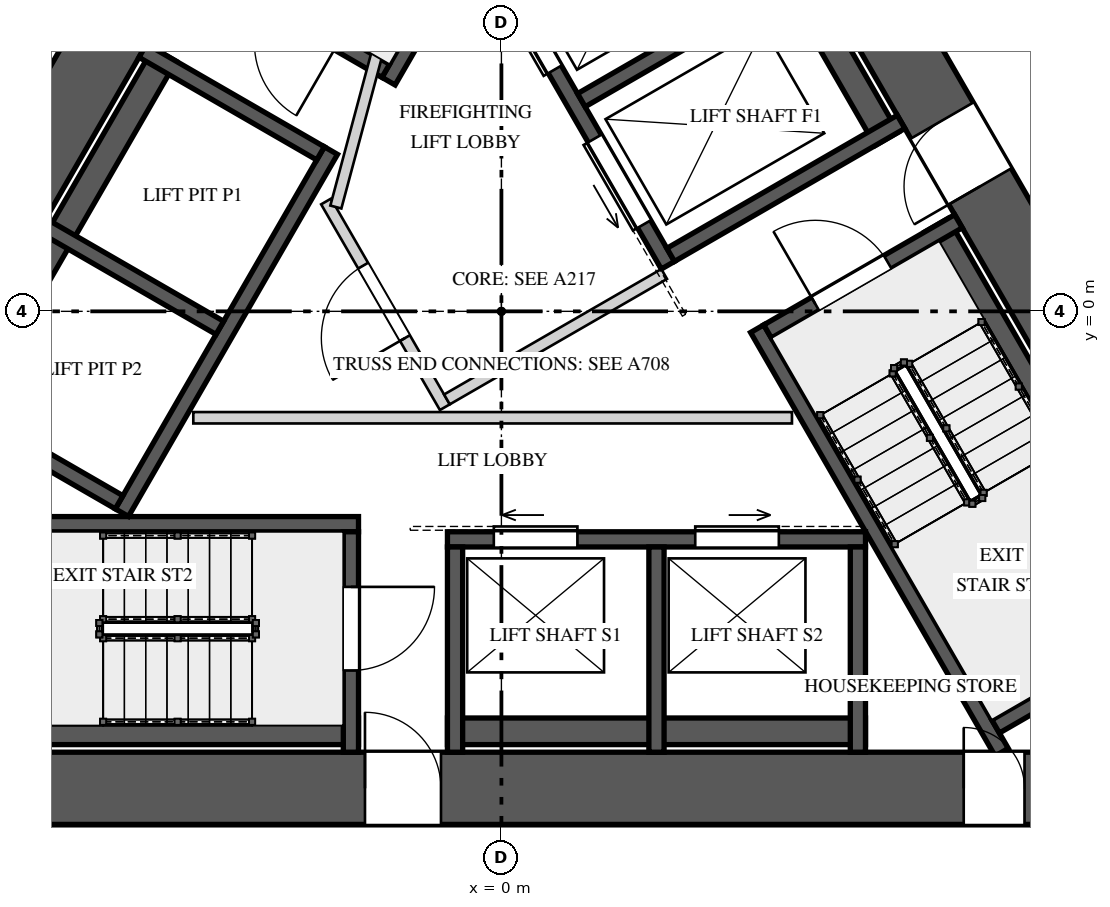
"""IFC4 building model, lengths in metres.
Left out: names, types, materials, properties, quantities, classifications, styles, units other than length and angle.
Written with IfcOpenShell. Run it as: python <this file> out.ifc"""

import sys

from ifc_helpers import new_model, si_unit, direction, frame, frame_2d, origin, place, context, subcontext, project, spatial, rectangle, extrude, element, fill, save


model = new_model("IFC4")
c1 = context("Model", 3, precision=1e-05, world=origin(), true_north=direction((0.0, 1.0)))
c2 = subcontext(c1, "Body", "Model", "MODEL_VIEW")
j1 = project(units=[si_unit("LENGTHUNIT", "METRE"), si_unit("PLANEANGLEUNIT", "RADIAN")], contexts=[c1])
p1 = place(None, origin())
s1 = spatial("IfcSite", under=j1, at=p1, CompositionType="ELEMENT")
p2 = place(p1, origin())
s2 = spatial("IfcBuilding", under=s1, at=p2, CompositionType="ELEMENT")
p3 = place(p2, frame((0.0, 0.0, 120.4)))
s3 = spatial("IfcBuildingStorey", under=s2, at=p3, CompositionType="ELEMENT", Elevation=120.4)
p4 = place(p3, frame((-1.169, 10.525, 0.0), z_axis=(0.0, 0.0, 1.0), x_axis=(-0.499999102847, -0.866025921755, 0.0)))
e1 = element("IfcWall", 1, at=p4, inside=s3, PredefinedType="SHEAR", context=c2, shape_type="SweptSolid", body=[
    extrude(rectangle(XDim=17.061, YDim=0.95, at=frame_2d((8.53, 0.0))), origin(), (0.0, 0.0, 1.0), 5.2),
])
p5 = place(p4, frame((6.735, 0.0, 0.0)))
e2 = element("IfcOpeningElement", 2, at=p5, cuts=e1, PredefinedType="OPENING", context=c2, shape_type="SweptSolid", body=[
    extrude(rectangle(XDim=1.0, YDim=2.4, at=frame_2d((0.5, 1.2))), frame((0.0, 0.485, 0.0), z_axis=(0.0, -1.0, 0.0), x_axis=(1.0, 0.0, 0.0)), (0.0, 0.0, 1.0), 0.97),
])
p6 = place(p3, frame((-8.531, -6.275, 0.0), z_axis=(0.0, 0.0, 1.0), x_axis=(1.0, 0.0, 0.0)))
e3 = element("IfcWall", 3, at=p6, inside=s3, PredefinedType="SHEAR", context=c2, shape_type="SweptSolid", body=[
    extrude(rectangle(XDim=17.061, YDim=0.95, at=frame_2d((8.531, 0.0))), origin(), (0.0, 0.0, 1.0), 5.2),
])
p7 = place(p6, frame((6.735, 0.0, 0.0)))
e4 = element("IfcOpeningElement", 4, at=p7, cuts=e3, PredefinedType="OPENING", context=c2, shape_type="SweptSolid", body=[
    extrude(rectangle(XDim=1.0, YDim=2.4, at=frame_2d((0.5, 1.2))), frame((0.0, 0.485, 0.0), z_axis=(0.0, -1.0, 0.0), x_axis=(1.0, 0.0, 0.0)), (0.0, 0.0, 1.0), 0.97),
])
p8 = place(p6, frame((14.613, 0.0, 0.0)))
e5 = element("IfcOpeningElement", 5, at=p8, cuts=e3, PredefinedType="OPENING", context=c2, shape_type="SweptSolid", body=[
    extrude(rectangle(XDim=0.8, YDim=2.1, at=frame_2d((0.4, 1.05))), frame((0.0, 0.485, 0.0), z_axis=(0.0, -1.0, 0.0), x_axis=(1.0, 0.0, 0.0)), (0.0, 0.0, 1.0), 0.97),
])
p9 = place(p3, frame((9.699, -4.25, 0.0), z_axis=(0.0, 0.0, 1.0), x_axis=(-0.499999102847, 0.866025921755, 0.0)))
e6 = element("IfcWall", 6, at=p9, inside=s3, PredefinedType="SHEAR", context=c2, shape_type="SweptSolid", body=[
    extrude(rectangle(XDim=17.061, YDim=0.95, at=frame_2d((8.53, 0.0))), origin(), (0.0, 0.0, 1.0), 5.2),
])
p10 = place(p9, frame((6.805, 0.0, 0.0)))
e7 = element("IfcOpeningElement", 7, at=p10, cuts=e6, PredefinedType="OPENING", context=c2, shape_type="SweptSolid", body=[
    extrude(rectangle(XDim=1.0, YDim=2.4, at=frame_2d((0.5, 1.2))), frame((0.0, 0.485, 0.0), z_axis=(0.0, -1.0, 0.0), x_axis=(1.0, 0.0, 0.0)), (0.0, 0.0, 1.0), 0.97),
])
p11 = place(p9, frame((14.114, 0.0, 0.0)))
e8 = element("IfcOpeningElement", 8, at=p11, cuts=e6, PredefinedType="OPENING", context=c2, shape_type="SweptSolid", body=[
    extrude(rectangle(XDim=0.8, YDim=2.1, at=frame_2d((0.4, 1.05))), frame((0.0, 0.485, 0.0), z_axis=(0.0, -1.0, 0.0), x_axis=(1.0, 0.0, 0.0)), (0.0, 0.0, 1.0), 0.97),
])
p12 = place(p3, frame((1.732, 8.6, 0.0), z_axis=(0.0, 0.0, 1.0), x_axis=(-0.499975376872, -0.866039619487, 0.0)))
e9 = element("IfcWall", 9, at=p12, inside=s3, PredefinedType="SOLIDWALL", context=c2, shape_type="SweptSolid", body=[
    extrude(rectangle(XDim=6.434, YDim=0.2, at=frame_2d((3.217, 0.0))), origin(), (0.0, 0.0, 1.0), 4.85),
])
p13 = place(p3, frame((-1.521, 3.165, 0.0), z_axis=(0.0, 0.0, 1.0), x_axis=(-0.866032775405, 0.499987231761, 0.0)))
e10 = element("IfcWall", 10, at=p13, inside=s3, PredefinedType="SOLIDWALL", context=c2, shape_type="SweptSolid", body=[
    extrude(rectangle(XDim=2.9, YDim=0.2, at=frame_2d((1.45, 0.0))), origin(), (0.0, 0.0, 1.0), 4.85),
])
p14 = place(p13, frame((0.725, 0.0, 0.0)))
e11 = element("IfcOpeningElement", 11, at=p14, cuts=e10, PredefinedType="OPENING", context=c2, shape_type="SweptSolid", body=[
    extrude(rectangle(XDim=1.1, YDim=2.4, at=frame_2d((0.55, 1.2))), frame((0.0, 0.11, 0.0), z_axis=(0.0, -1.0, 0.0), x_axis=(1.0, 0.0, 0.0)), (0.0, 0.0, 1.0), 0.22),
])
p15 = place(p3, frame((-8.08, -5.525, 0.0), z_axis=(0.0, 0.0, 1.0), x_axis=(1.0, 0.0, 0.0)))
e12 = element("IfcWall", 12, at=p15, inside=s3, PredefinedType="SOLIDWALL", context=c2, shape_type="SweptSolid", body=[
    extrude(rectangle(XDim=6.2, YDim=0.35, at=frame_2d((3.1, 0.0))), origin(), (0.0, 0.0, 1.0), 4.85),
])
p16 = place(p3, frame((-8.314, -2.8, 0.0), z_axis=(0.0, 0.0, 1.0), x_axis=(1.0, 0.0, 0.0)))
e13 = element("IfcWall", 13, at=p16, inside=s3, PredefinedType="SOLIDWALL", context=c2, shape_type="SweptSolid", body=[
    extrude(rectangle(XDim=6.434, YDim=0.2, at=frame_2d((3.217, 0.0))), origin(), (0.0, 0.0, 1.0), 4.85),
])
p17 = place(p3, frame((-1.98, -2.9, 0.0), z_axis=(0.0, 0.0, 1.0), x_axis=(0.0, -1.0, 0.0)))
e14 = element("IfcWall", 14, at=p17, inside=s3, PredefinedType="SOLIDWALL", context=c2, shape_type="SweptSolid", body=[
    extrude(rectangle(XDim=2.9, YDim=0.2, at=frame_2d((1.45, 0.0))), origin(), (0.0, 0.0, 1.0), 4.85),
])
p18 = place(p17, frame((0.725, 0.0, 0.0)))
e15 = element("IfcOpeningElement", 15, at=p18, cuts=e14, PredefinedType="OPENING", context=c2, shape_type="SweptSolid", body=[
    extrude(rectangle(XDim=1.1, YDim=2.4, at=frame_2d((0.55, 1.2))), frame((0.0, 0.11, 0.0), z_axis=(0.0, -1.0, 0.0), x_axis=(1.0, 0.0, 0.0)), (0.0, 0.0, 1.0), 0.22),
])
p19 = place(p3, frame((8.825, -4.235, 0.0), z_axis=(0.0, 0.0, 1.0), x_axis=(-0.499997426962, 0.866026889324, 0.0)))
e16 = element("IfcWall", 16, at=p19, inside=s3, PredefinedType="SOLIDWALL", context=c2, shape_type="SweptSolid", body=[
    extrude(rectangle(XDim=6.2, YDim=0.35, at=frame_2d((3.1, 0.0))), origin(), (0.0, 0.0, 1.0), 4.85),
])
p20 = place(p3, frame((6.582, -5.8, 0.0), z_axis=(0.0, 0.0, 1.0), x_axis=(-0.499975376872, 0.866039619487, 0.0)))
e17 = element("IfcWall", 17, at=p20, inside=s3, PredefinedType="SOLIDWALL", context=c2, shape_type="SweptSolid", body=[
    extrude(rectangle(XDim=6.434, YDim=0.2, at=frame_2d((3.217, 0.0))), origin(), (0.0, 0.0, 1.0), 4.85),
])
p21 = place(p3, frame((6.501, -5.461, 0.0), z_axis=(0.0, 0.0, 1.0), x_axis=(0.866032775405, 0.499987231761, 0.0)))
e18 = element("IfcWall", 18, at=p21, inside=s3, PredefinedType="SOLIDWALL", context=c2, shape_type="SweptSolid", body=[
    extrude(rectangle(XDim=2.9, YDim=0.2, at=frame_2d((1.45, 0.0))), origin(), (0.0, 0.0, 1.0), 4.85),
])
p22 = place(p3, frame((3.501, -0.265, 0.0), z_axis=(0.0, 0.0, 1.0), x_axis=(0.866032775405, 0.499987231761, 0.0)))
e19 = element("IfcWall", 19, at=p22, inside=s3, PredefinedType="SOLIDWALL", context=c2, shape_type="SweptSolid", body=[
    extrude(rectangle(XDim=2.9, YDim=0.2, at=frame_2d((1.45, 0.0))), origin(), (0.0, 0.0, 1.0), 4.85),
])
p23 = place(p22, frame((0.725, 0.0, 0.0)))
e20 = element("IfcOpeningElement", 20, at=p23, cuts=e19, PredefinedType="OPENING", context=c2, shape_type="SweptSolid", body=[
    extrude(rectangle(XDim=1.1, YDim=2.4, at=frame_2d((0.55, 1.2))), frame((0.0, 0.11, 0.0), z_axis=(0.0, -1.0, 0.0), x_axis=(1.0, 0.0, 0.0)), (0.0, 0.0, 1.0), 0.22),
])
p24 = place(p3, frame((-2.243, 2.115, 0.0), z_axis=(0.0, 0.0, 1.0), x_axis=(-0.499996545922, -0.866027397988, 0.0)))
e21 = element("IfcWall", 21, at=p24, inside=s3, PredefinedType="SOLIDWALL", context=c2, shape_type="SweptSolid", body=[
    extrude(rectangle(XDim=5.5, YDim=0.2, at=frame_2d((2.75, 0.0))), origin(), (0.0, 0.0, 1.0), 4.85),
])
p25 = place(p3, frame((-4.43, 3.377, 0.0), z_axis=(0.0, 0.0, 1.0), x_axis=(-0.499996545922, -0.866027397988, 0.0)))
e22 = element("IfcWall", 22, at=p25, inside=s3, PredefinedType="SOLIDWALL", context=c2, shape_type="SweptSolid", body=[
    extrude(rectangle(XDim=5.5, YDim=0.35, at=frame_2d((2.75, 0.0))), origin(), (0.0, 0.0, 1.0), 4.85),
])
p26 = place(p3, frame((-2.38, 2.078, 0.0), z_axis=(0.0, 0.0, 1.0), x_axis=(-0.866059108428, 0.4999416173, 0.0)))
e23 = element("IfcWall", 23, at=p26, inside=s3, PredefinedType="SOLIDWALL", context=c2, shape_type="SweptSolid", body=[
    extrude(rectangle(XDim=2.7, YDim=0.2, at=frame_2d((1.35, 0.0))), origin(), (0.0, 0.0, 1.0), 4.85),
])
p27 = place(p3, frame((-3.705, -0.217, 0.0), z_axis=(0.0, 0.0, 1.0), x_axis=(-0.866019956843, 0.50000943426, 0.0)))
e24 = element("IfcWall", 24, at=p27, inside=s3, PredefinedType="SOLIDWALL", context=c2, shape_type="SweptSolid", body=[
    extrude(rectangle(XDim=2.7, YDim=0.2, at=frame_2d((1.35, 0.0))), origin(), (0.0, 0.0, 1.0), 4.85),
])
p28 = place(p3, frame((-5.03, -2.512, 0.0), z_axis=(0.0, 0.0, 1.0), x_axis=(-0.86599734893, 0.500048589285, 0.0)))
e25 = element("IfcWall", 25, at=p28, inside=s3, PredefinedType="SOLIDWALL", context=c2, shape_type="SweptSolid", body=[
    extrude(rectangle(XDim=2.7, YDim=0.2, at=frame_2d((1.35, 0.0))), origin(), (0.0, 0.0, 1.0), 4.85),
])
p29 = place(p3, frame((-0.71, -3.0, 0.0), z_axis=(0.0, 0.0, 1.0), x_axis=(1.0, 0.0, 0.0)))
e26 = element("IfcWall", 26, at=p29, inside=s3, PredefinedType="SOLIDWALL", context=c2, shape_type="SweptSolid", body=[
    extrude(rectangle(XDim=5.5, YDim=0.2, at=frame_2d((2.75, 0.0))), origin(), (0.0, 0.0, 1.0), 4.85),
])
p30 = place(p29, frame((0.61, 0.0, 0.0)))
e27 = element("IfcOpeningElement", 27, at=p30, cuts=e26, PredefinedType="OPENING", context=c2, shape_type="SweptSolid", body=[
    extrude(rectangle(XDim=1.1, YDim=2.1, at=frame_2d((0.55, 1.05))), frame((0.0, 0.11, 0.0), z_axis=(0.0, -1.0, 0.0), x_axis=(1.0, 0.0, 0.0)), (0.0, 0.0, 1.0), 0.22),
])
p31 = place(p29, frame((3.26, 0.0, 0.0)))
e28 = element("IfcOpeningElement", 28, at=p31, cuts=e26, PredefinedType="OPENING", context=c2, shape_type="SweptSolid", body=[
    extrude(rectangle(XDim=1.1, YDim=2.1, at=frame_2d((0.55, 1.05))), frame((0.0, 0.11, 0.0), z_axis=(0.0, -1.0, 0.0), x_axis=(1.0, 0.0, 0.0)), (0.0, 0.0, 1.0), 0.22),
])
p32 = place(p3, frame((-0.71, -5.525, 0.0), z_axis=(0.0, 0.0, 1.0), x_axis=(1.0, 0.0, 0.0)))
e29 = element("IfcWall", 29, at=p32, inside=s3, PredefinedType="SOLIDWALL", context=c2, shape_type="SweptSolid", body=[
    extrude(rectangle(XDim=5.5, YDim=0.35, at=frame_2d((2.75, 0.0))), origin(), (0.0, 0.0, 1.0), 4.85),
])
for number, where, z_axis, x_axis in (
    (30, (-0.61, -3.1, 0.0), (0.0, 0.0, 1.0), (0.0, -1.0, 0.0)),
    (31, (2.04, -3.1, 0.0), (0.0, 0.0, 1.0), (0.0, -1.0, 0.0)),
    (32, (4.69, -3.1, 0.0), (0.0, 0.0, 1.0), (0.0, -1.0, 0.0)),
):
    element("IfcWall", number, at=place(p3, frame(where, z_axis=z_axis, x_axis=x_axis)), inside=s3, PredefinedType="SOLIDWALL", context=c2, shape_type="SweptSolid", body=[
        extrude(rectangle(XDim=2.7, YDim=0.2, at=frame_2d((1.35, 0.0))), origin(), (0.0, 0.0, 1.0), 4.85),
    ])
p33 = place(p3, frame((2.19, 0.606, 0.0), z_axis=(0.0, 0.0, 1.0), x_axis=(-0.500002801628, 0.866023786258, 0.0)))
e33 = element("IfcWall", 33, at=p33, inside=s3, PredefinedType="SOLIDWALL", context=c2, shape_type="SweptSolid", body=[
    extrude(rectangle(XDim=4.9, YDim=0.2, at=frame_2d((2.45, 0.0))), origin(), (0.0, 0.0, 1.0), 4.85),
])
p34 = place(p33, frame((0.625, 0.0, 0.0)))
e34 = element("IfcOpeningElement", 34, at=p34, cuts=e33, PredefinedType="OPENING", context=c2, shape_type="SweptSolid", body=[
    extrude(rectangle(XDim=1.3, YDim=2.1, at=frame_2d((0.65, 1.05))), frame((0.0, 0.11, 0.0), z_axis=(0.0, -1.0, 0.0), x_axis=(1.0, 0.0, 0.0)), (0.0, 0.0, 1.0), 0.22),
])
p35 = place(p33, frame((2.975, 0.0, 0.0)))
e35 = element("IfcOpeningElement", 35, at=p35, cuts=e33, PredefinedType="OPENING", context=c2, shape_type="SweptSolid", body=[
    extrude(rectangle(XDim=1.3, YDim=2.1, at=frame_2d((0.65, 1.05))), frame((0.0, 0.11, 0.0), z_axis=(0.0, -1.0, 0.0), x_axis=(1.0, 0.0, 0.0)), (0.0, 0.0, 1.0), 0.22),
])
p36 = place(p3, frame((5.07, 2.269, 0.0), z_axis=(0.0, 0.0, 1.0), x_axis=(-0.49998122708, 0.866036242063, 0.0)))
e36 = element("IfcWall", 36, at=p36, inside=s3, PredefinedType="SOLIDWALL", context=c2, shape_type="SweptSolid", body=[
    extrude(rectangle(XDim=4.9, YDim=0.35, at=frame_2d((2.45, 0.0))), origin(), (0.0, 0.0, 1.0), 4.85),
])
for number, where, z_axis, x_axis in (
    (37, (2.227, 0.743, 0.0), (0.0, 0.0, 1.0), (0.866, 0.5, 0.0)),
    (38, (1.052, 2.778, 0.0), (0.0, 0.0, 1.0), (0.866, 0.5, 0.0)),
):
    element("IfcWall", number, at=place(p3, frame(where, z_axis=z_axis, x_axis=x_axis)), inside=s3, PredefinedType="SOLIDWALL", context=c2, shape_type="SweptSolid", body=[
        extrude(rectangle(XDim=3.5, YDim=0.2, at=frame_2d((1.75, 0.0))), origin(), (0.0, 0.0, 1.0), 4.85),
    ])
p37 = place(p3, frame((-0.744, -1.261, 0.0), z_axis=(0.0, 0.0, 1.0), x_axis=(-0.500004234368, 0.866022959057, 0.0)))
e39 = element("IfcWall", 39, at=p37, inside=s3, PredefinedType="PARTITIONING", context=c2, shape_type="SweptSolid", body=[
    extrude(rectangle(XDim=3.125, YDim=0.15, at=frame_2d((1.562, 0.0))), origin(), (0.0, 0.0, 1.0), 4.85),
])
p38 = place(p37, frame((1.05, 0.0, 0.0)))
e40 = element("IfcOpeningElement", 40, at=p38, cuts=e39, PredefinedType="OPENING", context=c2, shape_type="SweptSolid", body=[
    extrude(rectangle(XDim=1.1, YDim=2.4, at=frame_2d((0.55, 1.2))), frame((0.0, 0.085, 0.0), z_axis=(0.0, -1.0, 0.0), x_axis=(1.0, 0.0, 0.0)), (0.0, 0.0, 1.0), 0.17),
])
p39 = place(p3, frame((-0.717, -1.159, 0.0), z_axis=(0.0, 0.0, 1.0), x_axis=(0.866008176907, 0.50002983664, 0.0)))
e41 = element("IfcWall", 41, at=p39, inside=s3, PredefinedType="PARTITIONING", context=c2, shape_type="SweptSolid", body=[
    extrude(rectangle(XDim=3.3, YDim=0.15, at=frame_2d((1.65, 0.0))), origin(), (0.0, 0.0, 1.0), 4.85),
])
p40 = place(p3, frame((-2.178, 1.372, 0.0), z_axis=(0.0, 0.0, 1.0), x_axis=(0.258808958833, 0.96592852884, 0.0)))
e42 = element("IfcWall", 42, at=p40, inside=s3, PredefinedType="PARTITIONING", context=c2, shape_type="SweptSolid", body=[
    extrude(rectangle(XDim=2.903, YDim=0.15, at=frame_2d((1.451, 0.0))), origin(), (0.0, 0.0, 1.0), 4.85),
])
p41 = place(p3, frame((-4.053, -1.4, 0.0), z_axis=(0.0, 0.0, 1.0), x_axis=(1.0, 0.0, 0.0)))
e43 = element("IfcWall", 43, at=p41, inside=s3, PredefinedType="PARTITIONING", context=c2, shape_type="SweptSolid", body=[
    extrude(rectangle(XDim=7.876, YDim=0.15, at=frame_2d((3.938, 0.0))), origin(), (0.0, 0.0, 1.0), 4.85),
])
p42 = place(p18, origin())
e44 = element("IfcDoor", 44, at=p42, inside=s3, OperationType="SINGLE_SWING_LEFT", PredefinedType="DOOR", context=c2, shape_type="SweptSolid", body=[
    extrude(rectangle(XDim=1.1, YDim=2.4, at=frame_2d((0.55, 1.2))), frame((0.0, 0.025, 0.0), z_axis=(0.0, -1.0, 0.0), x_axis=(1.0, 0.0, 0.0)), (0.0, 0.0, 1.0), 0.05),
])
fill(e15, e44)
p43 = place(p23, origin())
e45 = element("IfcDoor", 45, at=p43, inside=s3, OperationType="SINGLE_SWING_RIGHT", PredefinedType="DOOR", context=c2, shape_type="SweptSolid", body=[
    extrude(rectangle(XDim=1.1, YDim=2.4, at=frame_2d((0.55, 1.2))), frame((0.0, 0.025, 0.0), z_axis=(0.0, -1.0, 0.0), x_axis=(1.0, 0.0, 0.0)), (0.0, 0.0, 1.0), 0.05),
])
fill(e20, e45)
p44 = place(p30, origin())
e46 = element("IfcDoor", 46, at=p44, inside=s3, OperationType="SLIDING_TO_LEFT", PredefinedType="DOOR", context=c2, shape_type="SweptSolid", body=[
    extrude(rectangle(XDim=1.1, YDim=2.1, at=frame_2d((0.55, 1.05))), frame((0.0, 0.025, 0.0), z_axis=(0.0, -1.0, 0.0), x_axis=(1.0, 0.0, 0.0)), (0.0, 0.0, 1.0), 0.05),
])
fill(e27, e46)
p45 = place(p31, origin())
e47 = element("IfcDoor", 47, at=p45, inside=s3, OperationType="SLIDING_TO_RIGHT", PredefinedType="DOOR", context=c2, shape_type="SweptSolid", body=[
    extrude(rectangle(XDim=1.1, YDim=2.1, at=frame_2d((0.55, 1.05))), frame((0.0, 0.025, 0.0), z_axis=(0.0, -1.0, 0.0), x_axis=(1.0, 0.0, 0.0)), (0.0, 0.0, 1.0), 0.05),
])
fill(e28, e47)
p46 = place(p34, origin())
e48 = element("IfcDoor", 48, at=p46, inside=s3, OperationType="SLIDING_TO_LEFT", PredefinedType="DOOR", context=c2, shape_type="SweptSolid", body=[
    extrude(rectangle(XDim=1.3, YDim=2.1, at=frame_2d((0.65, 1.05))), frame((0.0, 0.025, 0.0), z_axis=(0.0, -1.0, 0.0), x_axis=(1.0, 0.0, 0.0)), (0.0, 0.0, 1.0), 0.05),
])
fill(e34, e48)
p47 = place(p35, origin())
e49 = element("IfcDoor", 49, at=p47, inside=s3, OperationType="SLIDING_TO_RIGHT", PredefinedType="DOOR", context=c2, shape_type="SweptSolid", body=[
    extrude(rectangle(XDim=1.3, YDim=2.1, at=frame_2d((0.65, 1.05))), frame((0.0, 0.025, 0.0), z_axis=(0.0, -1.0, 0.0), x_axis=(1.0, 0.0, 0.0)), (0.0, 0.0, 1.0), 0.05),
])
fill(e35, e49)
p48 = place(p38, origin())
e50 = element("IfcDoor", 50, at=p48, inside=s3, OperationType="SINGLE_SWING_LEFT", PredefinedType="DOOR", context=c2, shape_type="SweptSolid", body=[
    extrude(rectangle(XDim=1.1, YDim=2.4, at=frame_2d((0.55, 1.2))), frame((0.0, 0.025, 0.0), z_axis=(0.0, -1.0, 0.0), x_axis=(1.0, 0.0, 0.0)), (0.0, 0.0, 1.0), 0.05),
])
fill(e40, e50)
p49 = place(p7, origin())
e51 = element("IfcDoor", 51, at=p49, inside=s3, OperationType="SINGLE_SWING_LEFT", PredefinedType="DOOR", context=c2, shape_type="SweptSolid", body=[
    extrude(rectangle(XDim=1.0, YDim=2.4, at=frame_2d((0.5, 1.2))), frame((0.0, 0.025, 0.0), z_axis=(0.0, -1.0, 0.0), x_axis=(1.0, 0.0, 0.0)), (0.0, 0.0, 1.0), 0.05),
])
fill(e4, e51)
p50 = place(p10, origin())
e52 = element("IfcDoor", 52, at=p50, inside=s3, OperationType="SINGLE_SWING_RIGHT", PredefinedType="DOOR", context=c2, shape_type="SweptSolid", body=[
    extrude(rectangle(XDim=1.0, YDim=2.4, at=frame_2d((0.5, 1.2))), frame((0.0, 0.025, 0.0), z_axis=(0.0, -1.0, 0.0), x_axis=(1.0, 0.0, 0.0)), (0.0, 0.0, 1.0), 0.05),
])
fill(e7, e52)
p51 = place(p8, origin())
e53 = element("IfcDoor", 53, at=p51, inside=s3, OperationType="SINGLE_SWING_LEFT", PredefinedType="DOOR", context=c2, shape_type="SweptSolid", body=[
    extrude(rectangle(XDim=0.8, YDim=2.1, at=frame_2d((0.4, 1.05))), frame((0.0, 0.025, 0.0), z_axis=(0.0, -1.0, 0.0), x_axis=(1.0, 0.0, 0.0)), (0.0, 0.0, 1.0), 0.05),
])
fill(e5, e53)
save(model, sys.argv[1])
